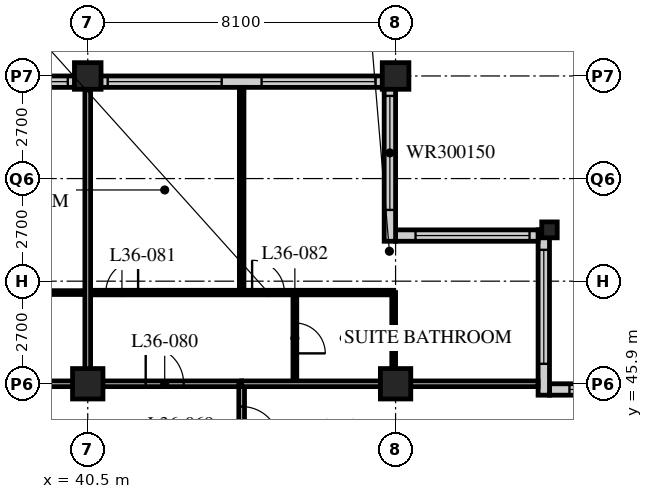
"""IFC4 building model, lengths in metres.
Left out: names, types, materials, properties, quantities, classifications, styles, units other than length and angle.
Written with IfcOpenShell. Run it as: python <this file> out.ifc"""

import sys

from ifc_helpers import new_model, si_unit, direction, frame, frame_2d, origin, origin_2d, place, context, subcontext, project, spatial, rectangle, hollow_rectangle, i_section, extrude, element, fill, save


model = new_model("IFC4")
c1 = context("Model", 3, precision=1e-05, world=origin(), true_north=direction((0.0, 1.0)))
c2 = subcontext(c1, "Body", "Model", "MODEL_VIEW")
j1 = project(units=[si_unit("LENGTHUNIT", "METRE"), si_unit("PLANEANGLEUNIT", "RADIAN")], contexts=[c1])
p1 = place(None, origin())
s1 = spatial("IfcSite", under=j1, at=p1, CompositionType="ELEMENT")
p2 = place(p1, origin())
s2 = spatial("IfcBuilding", under=s1, at=p2, CompositionType="ELEMENT")
p3 = place(p2, frame((0.0, 0.0, 140.8)))
s3 = spatial("IfcBuildingStorey", under=s2, at=p3, CompositionType="ELEMENT", Elevation=140.8)
p4 = place(p3, frame((40.5, 45.9, 0.0), z_axis=(0.0, 0.0, 1.0), x_axis=(1.0, 0.0, 0.0)))
e1 = element("IfcColumn", 1, at=p4, inside=s3, PredefinedType="COLUMN", context=c2, shape_type="SweptSolid", body=[
    extrude(hollow_rectangle(XDim=0.8, YDim=0.8, WallThickness=0.08, at=origin_2d()), origin(), (0.0, 0.0, 1.0), 3.4),
])
p5 = place(p3, frame((40.5, 54.0, 0.0), z_axis=(0.0, 0.0, 1.0), x_axis=(1.0, 0.0, 0.0)))
e2 = element("IfcColumn", 2, at=p5, inside=s3, PredefinedType="COLUMN", context=c2, shape_type="SweptSolid", body=[
    extrude(hollow_rectangle(XDim=0.7, YDim=0.7, WallThickness=0.07, at=origin_2d()), origin(), (0.0, 0.0, 1.0), 3.4),
])
p6 = place(p3, frame((48.6, 45.9, 0.0), z_axis=(0.0, 0.0, 1.0), x_axis=(1.0, 0.0, 0.0)))
e3 = element("IfcColumn", 3, at=p6, inside=s3, PredefinedType="COLUMN", context=c2, shape_type="SweptSolid", body=[
    extrude(hollow_rectangle(XDim=0.8, YDim=0.8, WallThickness=0.08, at=origin_2d()), origin(), (0.0, 0.0, 1.0), 3.4),
])
p7 = place(p3, frame((48.6, 54.0, 0.0), z_axis=(0.0, 0.0, 1.0), x_axis=(1.0, 0.0, 0.0)))
e4 = element("IfcColumn", 4, at=p7, inside=s3, PredefinedType="COLUMN", context=c2, shape_type="SweptSolid", body=[
    extrude(hollow_rectangle(XDim=0.7, YDim=0.7, WallThickness=0.07, at=origin_2d()), origin(), (0.0, 0.0, 1.0), 3.4),
])
p8 = place(p3, frame((52.65, 49.95, 0.0), z_axis=(0.0, 0.0, 1.0), x_axis=(1.0, 0.0, 0.0)))
e5 = element("IfcColumn", 5, at=p8, inside=s3, PredefinedType="COLUMN", context=c2, shape_type="SweptSolid", body=[
    extrude(i_section(OverallWidth=0.407, OverallDepth=0.419, WebThickness=0.031, FlangeThickness=0.049, FilletRadius=0.015, at=origin_2d()), origin(), (0.0, 0.0, 1.0), 3.4),
])
p9 = place(p3, frame((56.4, 45.75, 0.0), z_axis=(0.0, 0.0, 1.0), x_axis=(-1.0, 0.0, 0.0)))
e6 = element("IfcWall", 6, at=p9, inside=s3, PredefinedType="SOLIDWALL", context=c2, shape_type="SweptSolid", body=[
    extrude(rectangle(XDim=3.75, YDim=0.3, at=frame_2d((1.875, 0.0))), origin(), (0.0, 0.0, 1.0), 3.19),
])
p10 = place(p9, frame((0.225, 0.0, 0.9)))
e7 = element("IfcOpeningElement", 7, at=p10, cuts=e6, PredefinedType="OPENING", context=c2, shape_type="SweptSolid", body=[
    extrude(rectangle(XDim=3.0, YDim=1.5, at=frame_2d((1.5, 0.75))), frame((0.0, 0.16, 0.0), z_axis=(0.0, -1.0, 0.0), x_axis=(1.0, 0.0, 0.0)), (0.0, 0.0, 1.0), 0.32),
])
p11 = place(p3, frame((52.5, 45.6, 0.0), z_axis=(0.0, 0.0, 1.0), x_axis=(0.0, 1.0, 0.0)))
e8 = element("IfcWall", 8, at=p11, inside=s3, PredefinedType="SOLIDWALL", context=c2, shape_type="SweptSolid", body=[
    extrude(rectangle(XDim=4.35, YDim=0.3, at=frame_2d((2.175, 0.0))), origin(), (0.0, 0.0, 1.0), 3.19),
])
p12 = place(p11, frame((0.825, 0.0, 0.9)))
e9 = element("IfcOpeningElement", 9, at=p12, cuts=e8, PredefinedType="OPENING", context=c2, shape_type="SweptSolid", body=[
    extrude(rectangle(XDim=3.0, YDim=1.5, at=frame_2d((1.5, 0.75))), frame((0.0, 0.16, 0.0), z_axis=(0.0, -1.0, 0.0), x_axis=(1.0, 0.0, 0.0)), (0.0, 0.0, 1.0), 0.32),
])
p13 = place(p3, frame((52.35, 49.8, 0.0), z_axis=(0.0, 0.0, 1.0), x_axis=(-1.0, 0.0, 0.0)))
e10 = element("IfcWall", 10, at=p13, inside=s3, PredefinedType="SOLIDWALL", context=c2, shape_type="SweptSolid", body=[
    extrude(rectangle(XDim=3.75, YDim=0.3, at=frame_2d((1.875, 0.0))), origin(), (0.0, 0.0, 1.0), 3.19),
])
p14 = place(p13, frame((0.225, 0.0, 0.9)))
e11 = element("IfcOpeningElement", 11, at=p14, cuts=e10, PredefinedType="OPENING", context=c2, shape_type="SweptSolid", body=[
    extrude(rectangle(XDim=3.0, YDim=1.5, at=frame_2d((1.5, 0.75))), frame((0.0, 0.16, 0.0), z_axis=(0.0, -1.0, 0.0), x_axis=(1.0, 0.0, 0.0)), (0.0, 0.0, 1.0), 0.32),
])
p15 = place(p3, frame((48.45, 49.65, 0.0), z_axis=(0.0, 0.0, 1.0), x_axis=(0.0, 1.0, 0.0)))
e12 = element("IfcWall", 12, at=p15, inside=s3, PredefinedType="SOLIDWALL", context=c2, shape_type="SweptSolid", body=[
    extrude(rectangle(XDim=4.35, YDim=0.3, at=frame_2d((2.175, 0.0))), origin(), (0.0, 0.0, 1.0), 3.19),
])
p16 = place(p15, frame((0.825, 0.0, 0.9)))
e13 = element("IfcOpeningElement", 13, at=p16, cuts=e12, PredefinedType="OPENING", context=c2, shape_type="SweptSolid", body=[
    extrude(rectangle(XDim=3.0, YDim=1.5, at=frame_2d((1.5, 0.75))), frame((0.0, 0.16, 0.0), z_axis=(0.0, -1.0, 0.0), x_axis=(1.0, 0.0, 0.0)), (0.0, 0.0, 1.0), 0.32),
])
p17 = place(p3, frame((48.3, 53.85, 0.0), z_axis=(0.0, 0.0, 1.0), x_axis=(-1.0, 0.0, 0.0)))
e14 = element("IfcWall", 14, at=p17, inside=s3, PredefinedType="SOLIDWALL", context=c2, shape_type="SweptSolid", body=[
    extrude(rectangle(XDim=40.2, YDim=0.3, at=frame_2d((20.1, 0.0))), origin(), (0.0, 0.0, 1.0), 3.19),
])
p18 = place(p17, frame((0.225, 0.0, 0.9)))
e15 = element("IfcOpeningElement", 15, at=p18, cuts=e14, PredefinedType="OPENING", context=c2, shape_type="SweptSolid", body=[
    extrude(rectangle(XDim=3.0, YDim=2.0, at=frame_2d((1.5, 1.0))), frame((0.0, 0.16, 0.0), z_axis=(0.0, -1.0, 0.0), x_axis=(1.0, 0.0, 0.0)), (0.0, 0.0, 1.0), 0.32),
])
p19 = place(p17, frame((4.275, 0.0, 0.9)))
e16 = element("IfcOpeningElement", 16, at=p19, cuts=e14, PredefinedType="OPENING", context=c2, shape_type="SweptSolid", body=[
    extrude(rectangle(XDim=3.0, YDim=2.0, at=frame_2d((1.5, 1.0))), frame((0.0, 0.16, 0.0), z_axis=(0.0, -1.0, 0.0), x_axis=(1.0, 0.0, 0.0)), (0.0, 0.0, 1.0), 0.32),
])
p20 = place(p17, frame((8.325, 0.0, 0.9)))
e17 = element("IfcOpeningElement", 17, at=p20, cuts=e14, PredefinedType="OPENING", context=c2, shape_type="SweptSolid", body=[
    extrude(rectangle(XDim=3.0, YDim=2.0, at=frame_2d((1.5, 1.0))), frame((0.0, 0.16, 0.0), z_axis=(0.0, -1.0, 0.0), x_axis=(1.0, 0.0, 0.0)), (0.0, 0.0, 1.0), 0.32),
])
p21 = place(p17, frame((12.375, 0.0, 0.9)))
e18 = element("IfcOpeningElement", 18, at=p21, cuts=e14, PredefinedType="OPENING", context=c2, shape_type="SweptSolid", body=[
    extrude(rectangle(XDim=3.0, YDim=2.0, at=frame_2d((1.5, 1.0))), frame((0.0, 0.16, 0.0), z_axis=(0.0, -1.0, 0.0), x_axis=(1.0, 0.0, 0.0)), (0.0, 0.0, 1.0), 0.32),
])
p22 = place(p17, frame((16.425, 0.0, 0.9)))
e19 = element("IfcOpeningElement", 19, at=p22, cuts=e14, PredefinedType="OPENING", context=c2, shape_type="SweptSolid", body=[
    extrude(rectangle(XDim=3.0, YDim=2.0, at=frame_2d((1.5, 1.0))), frame((0.0, 0.16, 0.0), z_axis=(0.0, -1.0, 0.0), x_axis=(1.0, 0.0, 0.0)), (0.0, 0.0, 1.0), 0.32),
])
p23 = place(p17, frame((20.475, 0.0, 0.9)))
e20 = element("IfcOpeningElement", 20, at=p23, cuts=e14, PredefinedType="OPENING", context=c2, shape_type="SweptSolid", body=[
    extrude(rectangle(XDim=3.0, YDim=2.0, at=frame_2d((1.5, 1.0))), frame((0.0, 0.16, 0.0), z_axis=(0.0, -1.0, 0.0), x_axis=(1.0, 0.0, 0.0)), (0.0, 0.0, 1.0), 0.32),
])
p24 = place(p17, frame((24.525, 0.0, 0.9)))
e21 = element("IfcOpeningElement", 21, at=p24, cuts=e14, PredefinedType="OPENING", context=c2, shape_type="SweptSolid", body=[
    extrude(rectangle(XDim=3.0, YDim=2.0, at=frame_2d((1.5, 1.0))), frame((0.0, 0.16, 0.0), z_axis=(0.0, -1.0, 0.0), x_axis=(1.0, 0.0, 0.0)), (0.0, 0.0, 1.0), 0.32),
])
p25 = place(p17, frame((28.575, 0.0, 0.9)))
e22 = element("IfcOpeningElement", 22, at=p25, cuts=e14, PredefinedType="OPENING", context=c2, shape_type="SweptSolid", body=[
    extrude(rectangle(XDim=3.0, YDim=2.0, at=frame_2d((1.5, 1.0))), frame((0.0, 0.16, 0.0), z_axis=(0.0, -1.0, 0.0), x_axis=(1.0, 0.0, 0.0)), (0.0, 0.0, 1.0), 0.32),
])
p26 = place(p17, frame((32.625, 0.0, 0.9)))
e23 = element("IfcOpeningElement", 23, at=p26, cuts=e14, PredefinedType="OPENING", context=c2, shape_type="SweptSolid", body=[
    extrude(rectangle(XDim=3.0, YDim=2.0, at=frame_2d((1.5, 1.0))), frame((0.0, 0.16, 0.0), z_axis=(0.0, -1.0, 0.0), x_axis=(1.0, 0.0, 0.0)), (0.0, 0.0, 1.0), 0.32),
])
p27 = place(p17, frame((36.675, 0.0, 0.9)))
e24 = element("IfcOpeningElement", 24, at=p27, cuts=e14, PredefinedType="OPENING", context=c2, shape_type="SweptSolid", body=[
    extrude(rectangle(XDim=3.0, YDim=2.0, at=frame_2d((1.5, 1.0))), frame((0.0, 0.16, 0.0), z_axis=(0.0, -1.0, 0.0), x_axis=(1.0, 0.0, 0.0)), (0.0, 0.0, 1.0), 0.32),
])
p28 = place(p3, frame((8.1, 45.9, 0.0), z_axis=(0.0, 0.0, 1.0), x_axis=(1.0, 0.0, 0.0)))
e25 = element("IfcWall", 25, at=p28, inside=s3, PredefinedType="PARTITIONING", context=c2, shape_type="SweptSolid", body=[
    extrude(rectangle(XDim=36.45, YDim=0.15, at=frame_2d((18.225, 0.0))), origin(), (0.0, 0.0, 1.0), 2.578),
])
p29 = place(p28, frame((9.625, 0.0, 0.0)))
e26 = element("IfcOpeningElement", 26, at=p29, cuts=e25, PredefinedType="OPENING", context=c2, shape_type="SweptSolid", body=[
    extrude(rectangle(XDim=1.0, YDim=2.1, at=frame_2d((0.5, 1.05))), frame((0.0, 0.085, 0.0), z_axis=(0.0, -1.0, 0.0), x_axis=(1.0, 0.0, 0.0)), (0.0, 0.0, 1.0), 0.17),
])
p30 = place(p28, frame((21.775, 0.0, 0.0)))
e27 = element("IfcOpeningElement", 27, at=p30, cuts=e25, PredefinedType="OPENING", context=c2, shape_type="SweptSolid", body=[
    extrude(rectangle(XDim=1.0, YDim=2.1, at=frame_2d((0.5, 1.05))), frame((0.0, 0.085, 0.0), z_axis=(0.0, -1.0, 0.0), x_axis=(1.0, 0.0, 0.0)), (0.0, 0.0, 1.0), 0.17),
])
p31 = place(p28, frame((28.95, 0.0, 0.0)))
e28 = element("IfcOpeningElement", 28, at=p31, cuts=e25, PredefinedType="OPENING", context=c2, shape_type="SweptSolid", body=[
    extrude(rectangle(XDim=1.0, YDim=2.1, at=frame_2d((0.5, 1.05))), frame((0.0, 0.085, 0.0), z_axis=(0.0, -1.0, 0.0), x_axis=(1.0, 0.0, 0.0)), (0.0, 0.0, 1.0), 0.17),
])
p32 = place(p28, frame((33.925, 0.0, 0.0)))
e29 = element("IfcOpeningElement", 29, at=p32, cuts=e25, PredefinedType="OPENING", context=c2, shape_type="SweptSolid", body=[
    extrude(rectangle(XDim=1.0, YDim=2.1, at=frame_2d((0.5, 1.05))), frame((0.0, 0.085, 0.0), z_axis=(0.0, -1.0, 0.0), x_axis=(1.0, 0.0, 0.0)), (0.0, 0.0, 1.0), 0.17),
])
p33 = place(p28, frame((2.625, 0.0, 0.0)))
e30 = element("IfcOpeningElement", 30, at=p33, cuts=e25, PredefinedType="OPENING", context=c2, shape_type="SweptSolid", body=[
    extrude(rectangle(XDim=1.0, YDim=2.1, at=frame_2d((0.5, 1.05))), frame((0.0, 0.085, 0.0), z_axis=(0.0, -1.0, 0.0), x_axis=(1.0, 0.0, 0.0)), (0.0, 0.0, 1.0), 0.17),
])
p34 = place(p3, frame((44.55, 17.55, 0.0), z_axis=(0.0, 0.0, 1.0), x_axis=(0.0, 1.0, 0.0)))
e31 = element("IfcWall", 31, at=p34, inside=s3, PredefinedType="PARTITIONING", context=c2, shape_type="SweptSolid", body=[
    extrude(rectangle(XDim=28.35, YDim=0.15, at=frame_2d((14.175, 0.0))), origin(), (0.0, 0.0, 1.0), 3.19),
])
p35 = place(p34, frame((2.75, 0.0, 0.0)))
e32 = element("IfcOpeningElement", 32, at=p35, cuts=e31, PredefinedType="OPENING", context=c2, shape_type="SweptSolid", body=[
    extrude(rectangle(XDim=1.0, YDim=2.1, at=frame_2d((0.5, 1.05))), frame((0.0, 0.085, 0.0), z_axis=(0.0, -1.0, 0.0), x_axis=(1.0, 0.0, 0.0)), (0.0, 0.0, 1.0), 0.17),
])
p36 = place(p34, frame((6.5, 0.0, 0.0)))
e33 = element("IfcOpeningElement", 33, at=p36, cuts=e31, PredefinedType="OPENING", context=c2, shape_type="SweptSolid", body=[
    extrude(rectangle(XDim=1.0, YDim=2.1, at=frame_2d((0.5, 1.05))), frame((0.0, 0.085, 0.0), z_axis=(0.0, -1.0, 0.0), x_axis=(1.0, 0.0, 0.0)), (0.0, 0.0, 1.0), 0.17),
])
p37 = place(p34, frame((13.55, 0.0, 0.0)))
e34 = element("IfcOpeningElement", 34, at=p37, cuts=e31, PredefinedType="OPENING", context=c2, shape_type="SweptSolid", body=[
    extrude(rectangle(XDim=1.0, YDim=2.1, at=frame_2d((0.5, 1.05))), frame((0.0, 0.085, 0.0), z_axis=(0.0, -1.0, 0.0), x_axis=(1.0, 0.0, 0.0)), (0.0, 0.0, 1.0), 0.17),
])
p38 = place(p34, frame((18.1, 0.0, 0.0)))
e35 = element("IfcOpeningElement", 35, at=p38, cuts=e31, PredefinedType="OPENING", context=c2, shape_type="SweptSolid", body=[
    extrude(rectangle(XDim=1.0, YDim=2.1, at=frame_2d((0.5, 1.05))), frame((0.0, 0.085, 0.0), z_axis=(0.0, -1.0, 0.0), x_axis=(1.0, 0.0, 0.0)), (0.0, 0.0, 1.0), 0.17),
])
p39 = place(p34, frame((26.75, 0.0, 0.0)))
e36 = element("IfcOpeningElement", 36, at=p39, cuts=e31, PredefinedType="OPENING", context=c2, shape_type="SweptSolid", body=[
    extrude(rectangle(XDim=1.0, YDim=2.1, at=frame_2d((0.5, 1.05))), frame((0.0, 0.085, 0.0), z_axis=(0.0, -1.0, 0.0), x_axis=(1.0, 0.0, 0.0)), (0.0, 0.0, 1.0), 0.17),
])
p40 = place(p3, frame((38.2, 48.3, 0.0), z_axis=(0.0, 0.0, 1.0), x_axis=(1.0, 0.0, 0.0)))
e37 = element("IfcWall", 37, at=p40, inside=s3, PredefinedType="PARTITIONING", context=c2, shape_type="SweptSolid", body=[
    extrude(rectangle(XDim=2.3, YDim=0.1, at=frame_2d((1.15, 0.0))), origin(), (0.0, 0.0, 1.0), 3.19),
])
p41 = place(p3, frame((40.5, 48.3, 0.0), z_axis=(0.0, 0.0, 1.0), x_axis=(1.0, 0.0, 0.0)))
e38 = element("IfcWall", 38, at=p41, inside=s3, PredefinedType="PARTITIONING", context=c2, shape_type="SweptSolid", body=[
    extrude(rectangle(XDim=8.05, YDim=0.12, at=frame_2d((4.025, 0.0))), origin(), (0.0, 0.0, 1.0), 3.19),
])
p42 = place(p41, frame((0.475, 0.0, 0.0)))
e39 = element("IfcOpeningElement", 39, at=p42, cuts=e38, PredefinedType="OPENING", context=c2, shape_type="SweptSolid", body=[
    extrude(rectangle(XDim=0.85, YDim=2.1, at=frame_2d((0.425, 1.05))), frame((0.0, 0.07, 0.0), z_axis=(0.0, -1.0, 0.0), x_axis=(1.0, 0.0, 0.0)), (0.0, 0.0, 1.0), 0.14),
])
p43 = place(p41, frame((4.325, 0.0, 0.0)))
e40 = element("IfcOpeningElement", 40, at=p43, cuts=e38, PredefinedType="OPENING", context=c2, shape_type="SweptSolid", body=[
    extrude(rectangle(XDim=0.85, YDim=2.1, at=frame_2d((0.425, 1.05))), frame((0.0, 0.07, 0.0), z_axis=(0.0, -1.0, 0.0), x_axis=(1.0, 0.0, 0.0)), (0.0, 0.0, 1.0), 0.14),
])
p44 = place(p3, frame((45.95, 45.9, 0.0), z_axis=(0.0, 0.0, 1.0), x_axis=(0.0, 1.0, 0.0)))
e41 = element("IfcWall", 41, at=p44, inside=s3, PredefinedType="PARTITIONING", context=c2, shape_type="SweptSolid", body=[
    extrude(rectangle(XDim=2.4, YDim=0.1, at=frame_2d((1.2, 0.0))), origin(), (0.0, 0.0, 1.0), 3.19),
])
p45 = place(p44, frame((0.8, 0.0, 0.0)))
e42 = element("IfcOpeningElement", 42, at=p45, cuts=e41, PredefinedType="OPENING", context=c2, shape_type="SweptSolid", body=[
    extrude(rectangle(XDim=0.8, YDim=2.1, at=frame_2d((0.4, 1.05))), frame((0.0, 0.06, 0.0), z_axis=(0.0, -1.0, 0.0), x_axis=(1.0, 0.0, 0.0)), (0.0, 0.0, 1.0), 0.12),
])
p46 = place(p3, frame((48.55, 45.9, 0.0), z_axis=(0.0, 0.0, 1.0), x_axis=(0.0, 1.0, 0.0)))
e43 = element("IfcWall", 43, at=p46, inside=s3, PredefinedType="PARTITIONING", context=c2, shape_type="SweptSolid", body=[
    extrude(rectangle(XDim=2.4, YDim=0.1, at=frame_2d((1.2, 0.0))), origin(), (0.0, 0.0, 1.0), 2.578),
])
p47 = place(p3, frame((44.55, 48.3, 0.0), z_axis=(0.0, 0.0, 1.0), x_axis=(0.0, 1.0, 0.0)))
e44 = element("IfcWall", 44, at=p47, inside=s3, PredefinedType="PARTITIONING", context=c2, shape_type="SweptSolid", body=[
    extrude(rectangle(XDim=5.4, YDim=0.12, at=frame_2d((2.7, 0.0))), origin(), (0.0, 0.0, 1.0), 3.19),
])
for number, where, z_axis, x_axis in (
    (45, (44.55, 45.9, 0.0), (0.0, 0.0, 1.0), (1.0, 0.0, 0.0)),
    (46, (40.5, 45.9, 0.0), (0.0, 0.0, 1.0), (0.0, 1.0, 0.0)),
):
    element("IfcWall", number, at=place(p3, frame(where, z_axis=z_axis, x_axis=x_axis)), inside=s3, PredefinedType="PARTITIONING", context=c2, shape_type="SweptSolid", body=[
        extrude(rectangle(XDim=7.8, YDim=0.15, at=frame_2d((3.9, 0.0))), origin(), (0.0, 0.0, 1.0), 2.578),
    ])
p48 = place(p10, origin())
e47 = element("IfcWindow", 47, at=p48, inside=s3, PartitioningType="SINGLE_PANEL", PredefinedType="WINDOW", context=c2, shape_type="SweptSolid", body=[
    extrude(rectangle(XDim=3.0, YDim=1.5, at=frame_2d((1.5, 0.75))), frame((0.0, 0.03, 0.0), z_axis=(0.0, -1.0, 0.0), x_axis=(1.0, 0.0, 0.0)), (0.0, 0.0, 1.0), 0.06),
])
fill(e7, e47)
p49 = place(p12, origin())
e48 = element("IfcWindow", 48, at=p49, inside=s3, PartitioningType="SINGLE_PANEL", PredefinedType="WINDOW", context=c2, shape_type="SweptSolid", body=[
    extrude(rectangle(XDim=3.0, YDim=1.5, at=frame_2d((1.5, 0.75))), frame((0.0, 0.03, 0.0), z_axis=(0.0, -1.0, 0.0), x_axis=(1.0, 0.0, 0.0)), (0.0, 0.0, 1.0), 0.06),
])
fill(e9, e48)
p50 = place(p14, origin())
e49 = element("IfcWindow", 49, at=p50, inside=s3, PartitioningType="SINGLE_PANEL", PredefinedType="WINDOW", context=c2, shape_type="SweptSolid", body=[
    extrude(rectangle(XDim=3.0, YDim=1.5, at=frame_2d((1.5, 0.75))), frame((0.0, 0.03, 0.0), z_axis=(0.0, -1.0, 0.0), x_axis=(1.0, 0.0, 0.0)), (0.0, 0.0, 1.0), 0.06),
])
fill(e11, e49)
p51 = place(p16, origin())
e50 = element("IfcWindow", 50, at=p51, inside=s3, PartitioningType="SINGLE_PANEL", PredefinedType="WINDOW", context=c2, shape_type="SweptSolid", body=[
    extrude(rectangle(XDim=3.0, YDim=1.5, at=frame_2d((1.5, 0.75))), frame((0.0, 0.03, 0.0), z_axis=(0.0, -1.0, 0.0), x_axis=(1.0, 0.0, 0.0)), (0.0, 0.0, 1.0), 0.06),
])
fill(e13, e50)
p52 = place(p18, origin())
e51 = element("IfcWindow", 51, at=p52, inside=s3, PartitioningType="SINGLE_PANEL", PredefinedType="WINDOW", context=c2, shape_type="SweptSolid", body=[
    extrude(rectangle(XDim=3.0, YDim=2.0, at=frame_2d((1.5, 1.0))), frame((0.0, 0.03, 0.0), z_axis=(0.0, -1.0, 0.0), x_axis=(1.0, 0.0, 0.0)), (0.0, 0.0, 1.0), 0.06),
])
fill(e15, e51)
p53 = place(p19, origin())
e52 = element("IfcWindow", 52, at=p53, inside=s3, PartitioningType="SINGLE_PANEL", PredefinedType="WINDOW", context=c2, shape_type="SweptSolid", body=[
    extrude(rectangle(XDim=3.0, YDim=2.0, at=frame_2d((1.5, 1.0))), frame((0.0, 0.03, 0.0), z_axis=(0.0, -1.0, 0.0), x_axis=(1.0, 0.0, 0.0)), (0.0, 0.0, 1.0), 0.06),
])
fill(e16, e52)
p54 = place(p20, origin())
e53 = element("IfcWindow", 53, at=p54, inside=s3, PartitioningType="SINGLE_PANEL", PredefinedType="WINDOW", context=c2, shape_type="SweptSolid", body=[
    extrude(rectangle(XDim=3.0, YDim=2.0, at=frame_2d((1.5, 1.0))), frame((0.0, 0.03, 0.0), z_axis=(0.0, -1.0, 0.0), x_axis=(1.0, 0.0, 0.0)), (0.0, 0.0, 1.0), 0.06),
])
fill(e17, e53)
p55 = place(p39, origin())
e54 = element("IfcDoor", 54, at=p55, inside=s3, OperationType="SINGLE_SWING_RIGHT", PredefinedType="DOOR", context=c2, shape_type="SweptSolid", body=[
    extrude(rectangle(XDim=1.0, YDim=2.1, at=frame_2d((0.5, 1.05))), frame((0.0, 0.025, 0.0), z_axis=(0.0, -1.0, 0.0), x_axis=(1.0, 0.0, 0.0)), (0.0, 0.0, 1.0), 0.05),
])
fill(e36, e54)
p56 = place(p32, origin())
e55 = element("IfcDoor", 55, at=p56, inside=s3, OperationType="SINGLE_SWING_LEFT", PredefinedType="DOOR", context=c2, shape_type="SweptSolid", body=[
    extrude(rectangle(XDim=1.0, YDim=2.1, at=frame_2d((0.5, 1.05))), frame((0.0, 0.025, 0.0), z_axis=(0.0, -1.0, 0.0), x_axis=(1.0, 0.0, 0.0)), (0.0, 0.0, 1.0), 0.05),
])
fill(e29, e55)
p57 = place(p42, origin())
e56 = element("IfcDoor", 56, at=p57, inside=s3, OperationType="SINGLE_SWING_RIGHT", PredefinedType="DOOR", context=c2, shape_type="SweptSolid", body=[
    extrude(rectangle(XDim=0.85, YDim=2.1, at=frame_2d((0.425, 1.05))), frame((0.0, 0.025, 0.0), z_axis=(0.0, -1.0, 0.0), x_axis=(1.0, 0.0, 0.0)), (0.0, 0.0, 1.0), 0.05),
])
fill(e39, e56)
p58 = place(p45, origin())
e57 = element("IfcDoor", 57, at=p58, inside=s3, OperationType="SINGLE_SWING_RIGHT", PredefinedType="DOOR", context=c2, shape_type="SweptSolid", body=[
    extrude(rectangle(XDim=0.8, YDim=2.1, at=frame_2d((0.4, 1.05))), frame((0.0, 0.025, 0.0), z_axis=(0.0, -1.0, 0.0), x_axis=(1.0, 0.0, 0.0)), (0.0, 0.0, 1.0), 0.05),
])
fill(e42, e57)
p59 = place(p43, origin())
e58 = element("IfcDoor", 58, at=p59, inside=s3, OperationType="SINGLE_SWING_LEFT", PredefinedType="DOOR", context=c2, shape_type="SweptSolid", body=[
    extrude(rectangle(XDim=0.85, YDim=2.1, at=frame_2d((0.425, 1.05))), frame((0.0, 0.025, 0.0), z_axis=(0.0, -1.0, 0.0), x_axis=(1.0, 0.0, 0.0)), (0.0, 0.0, 1.0), 0.05),
])
fill(e40, e58)
save(model, sys.argv[1])
